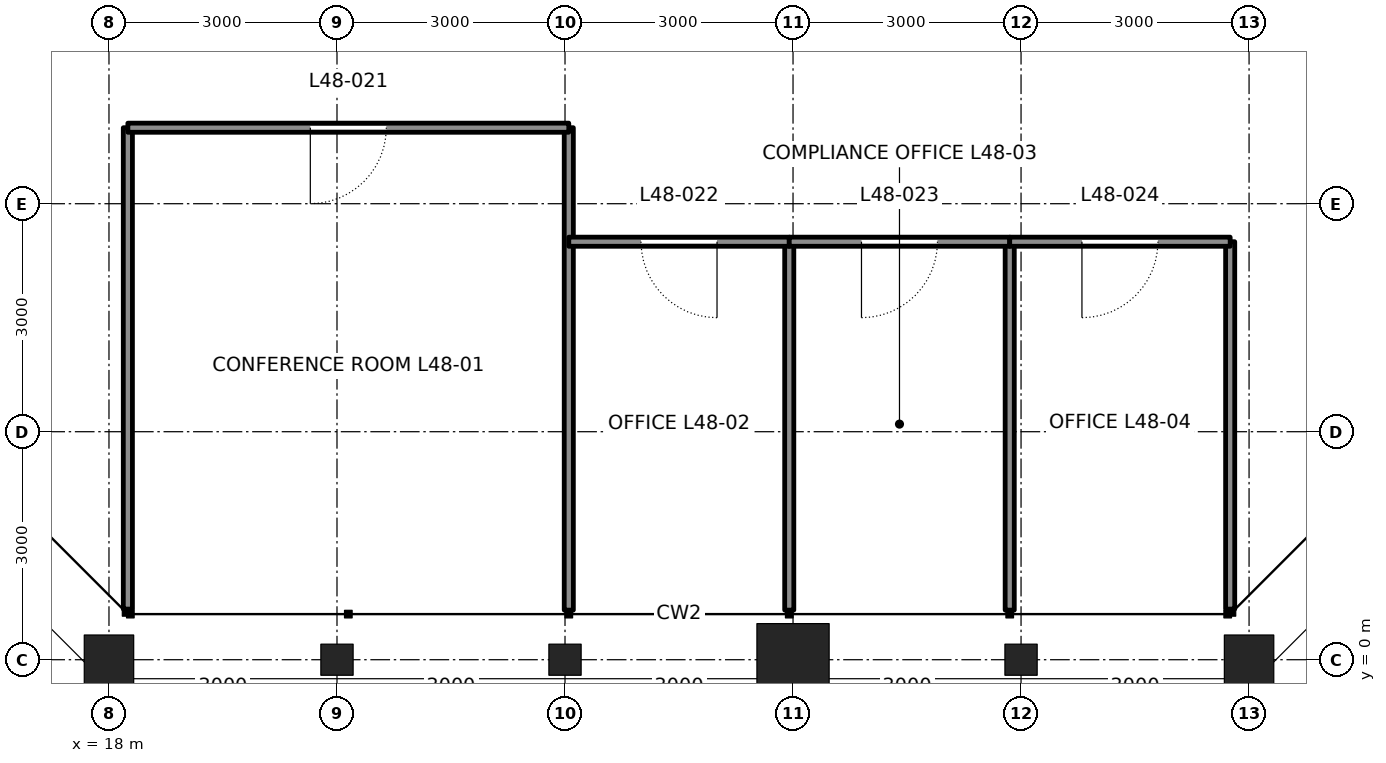
"""IFC4 building model, lengths in metres.
Left out: names, types, materials, properties, quantities, classifications, styles, units other than length and angle.
Written with IfcOpenShell. Run it as: python <this file> out.ifc"""

import sys

from ifc_helpers import new_model, si_unit, direction, frame, frame_2d, origin, origin_2d, place, context, subcontext, project, spatial, rectangle, hollow_rectangle, i_section, extrude, element, fill, save


model = new_model("IFC4")
c1 = context("Model", 3, precision=1e-05, world=origin(), true_north=direction((0.0, 1.0)))
c2 = subcontext(c1, "Body", "Model", "MODEL_VIEW")
j1 = project(units=[si_unit("LENGTHUNIT", "METRE"), si_unit("PLANEANGLEUNIT", "RADIAN")], contexts=[c1])
p1 = place(None, origin())
s1 = spatial("IfcSite", under=j1, at=p1, CompositionType="ELEMENT")
p2 = place(p1, origin())
s2 = spatial("IfcBuilding", under=s1, at=p2, CompositionType="ELEMENT")
p3 = place(p2, frame((0.0, 0.0, 218.1)))
s3 = spatial("IfcBuildingStorey", under=s2, at=p3, CompositionType="ELEMENT", Elevation=218.1)
p4 = place(p3, frame((18.0, 0.0, 0.0), z_axis=(0.0, 0.0, 1.0), x_axis=(0.0, -1.0, 0.0)))
e1 = element("IfcColumn", 1, at=p4, inside=s3, PredefinedType="COLUMN", context=c2, shape_type="SweptSolid", body=[
    extrude(hollow_rectangle(XDim=0.65, YDim=0.65, WallThickness=0.065, at=origin_2d()), origin(), (0.0, 0.0, 1.0), 4.2),
])
for number, where, z_axis, x_axis in (
    (2, (21.0, 0.0, 0.0), (0.0, 0.0, 1.0), (0.0, -1.0, 0.0)),
    (3, (24.0, 0.0, 0.0), (0.0, 0.0, 1.0), (0.0, -1.0, 0.0)),
):
    element("IfcColumn", number, at=place(p3, frame(where, z_axis=z_axis, x_axis=x_axis)), inside=s3, PredefinedType="COLUMN", context=c2, shape_type="SweptSolid", body=[
        extrude(i_section(OverallWidth=0.409, OverallDepth=0.424, WebThickness=0.033, FlangeThickness=0.052, at=origin_2d()), origin(), (0.0, 0.0, 1.0), 4.2),
    ])
p5 = place(p3, frame((27.0, 0.0, 0.0), z_axis=(0.0, 0.0, 1.0), x_axis=(0.0, -1.0, 0.0)))
e4 = element("IfcColumn", 4, at=p5, inside=s3, PredefinedType="COLUMN", context=c2, shape_type="SweptSolid", body=[
    extrude(hollow_rectangle(XDim=0.95, YDim=0.95, WallThickness=0.11, at=origin_2d()), origin(), (0.0, 0.0, 1.0), 4.2),
])
p6 = place(p3, frame((30.0, 0.0, 0.0), z_axis=(0.0, 0.0, 1.0), x_axis=(0.0, -1.0, 0.0)))
e5 = element("IfcColumn", 5, at=p6, inside=s3, PredefinedType="COLUMN", context=c2, shape_type="SweptSolid", body=[
    extrude(i_section(OverallWidth=0.409, OverallDepth=0.424, WebThickness=0.033, FlangeThickness=0.052, at=origin_2d()), origin(), (0.0, 0.0, 1.0), 4.2),
])
p7 = place(p3, frame((33.0, 0.0, 0.0), z_axis=(0.0, 0.0, 1.0), x_axis=(0.0, -1.0, 0.0)))
e6 = element("IfcColumn", 6, at=p7, inside=s3, PredefinedType="COLUMN", context=c2, shape_type="SweptSolid", body=[
    extrude(hollow_rectangle(XDim=0.65, YDim=0.65, WallThickness=0.065, at=origin_2d()), origin(), (0.0, 0.0, 1.0), 4.2),
])
p8 = place(p3, frame((18.249, 0.666, 0.0), z_axis=(0.0, 0.0, 1.0), x_axis=(0.0, 1.0, 0.0)))
e7 = element("IfcWall", 7, at=p8, inside=s3, PredefinedType="PARTITIONING", context=c2, shape_type="SweptSolid", body=[
    extrude(rectangle(XDim=6.334, YDim=0.12, at=frame_2d((3.167, 0.0))), origin(), (0.0, 0.0, 1.0), 4.04),
])
p9 = place(p3, frame((24.05, 0.653, 0.0), z_axis=(0.0, 0.0, 1.0), x_axis=(0.0, 1.0, 0.0)))
e8 = element("IfcWall", 8, at=p9, inside=s3, PredefinedType="PARTITIONING", context=c2, shape_type="SweptSolid", body=[
    extrude(rectangle(XDim=6.347, YDim=0.12, at=frame_2d((3.174, 0.0))), origin(), (0.0, 0.0, 1.0), 3.357),
])
p10 = place(p3, frame((26.95, 0.653, 0.0), z_axis=(0.0, 0.0, 1.0), x_axis=(0.0, 1.0, 0.0)))
e9 = element("IfcWall", 9, at=p10, inside=s3, PredefinedType="PARTITIONING", context=c2, shape_type="SweptSolid", body=[
    extrude(rectangle(XDim=4.847, YDim=0.12, at=frame_2d((2.424, 0.0))), origin(), (0.0, 0.0, 1.0), 3.357),
])
p11 = place(p3, frame((29.851, 0.653, 0.0), z_axis=(0.0, 0.0, 1.0), x_axis=(0.0, 1.0, 0.0)))
e10 = element("IfcWall", 10, at=p11, inside=s3, PredefinedType="PARTITIONING", context=c2, shape_type="SweptSolid", body=[
    extrude(rectangle(XDim=4.847, YDim=0.12, at=frame_2d((2.424, 0.0))), origin(), (0.0, 0.0, 1.0), 4.04),
])
p12 = place(p3, frame((32.751, 0.666, 0.0), z_axis=(0.0, 0.0, 1.0), x_axis=(0.0, 1.0, 0.0)))
e11 = element("IfcWall", 11, at=p12, inside=s3, PredefinedType="PARTITIONING", context=c2, shape_type="SweptSolid", body=[
    extrude(rectangle(XDim=4.834, YDim=0.12, at=frame_2d((2.417, 0.0))), origin(), (0.0, 0.0, 1.0), 4.04),
])
p13 = place(p3, frame((18.249, 7.0, 0.0), z_axis=(0.0, 0.0, 1.0), x_axis=(1.0, 0.0, 0.0)))
e12 = element("IfcWall", 12, at=p13, inside=s3, PredefinedType="PARTITIONING", context=c2, shape_type="SweptSolid", body=[
    extrude(rectangle(XDim=5.801, YDim=0.12, at=frame_2d((2.901, 0.0))), origin(), (0.0, 0.0, 1.0), 4.04),
])
p14 = place(p13, frame((2.401, 0.0, 0.0)))
e13 = element("IfcOpeningElement", 13, at=p14, cuts=e12, PredefinedType="OPENING", context=c2, shape_type="SweptSolid", body=[
    extrude(rectangle(XDim=1.0, YDim=2.4, at=frame_2d((0.5, 1.2))), frame((0.0, 0.07, 0.0), z_axis=(0.0, -1.0, 0.0), x_axis=(1.0, 0.0, 0.0)), (0.0, 0.0, 1.0), 0.14),
])
p15 = place(p3, frame((24.05, 5.5, 0.0), z_axis=(0.0, 0.0, 1.0), x_axis=(1.0, 0.0, 0.0)))
e14 = element("IfcWall", 14, at=p15, inside=s3, PredefinedType="PARTITIONING", context=c2, shape_type="SweptSolid", body=[
    extrude(rectangle(XDim=2.9, YDim=0.12, at=frame_2d((1.45, 0.0))), origin(), (0.0, 0.0, 1.0), 4.04),
])
p16 = place(p15, frame((0.95, 0.0, 0.0)))
e15 = element("IfcOpeningElement", 15, at=p16, cuts=e14, PredefinedType="OPENING", context=c2, shape_type="SweptSolid", body=[
    extrude(rectangle(XDim=1.0, YDim=2.4, at=frame_2d((0.5, 1.2))), frame((0.0, 0.07, 0.0), z_axis=(0.0, -1.0, 0.0), x_axis=(1.0, 0.0, 0.0)), (0.0, 0.0, 1.0), 0.14),
])
p17 = place(p3, frame((26.95, 5.5, 0.0), z_axis=(0.0, 0.0, 1.0), x_axis=(1.0, 0.0, 0.0)))
e16 = element("IfcWall", 16, at=p17, inside=s3, PredefinedType="PARTITIONING", context=c2, shape_type="SweptSolid", body=[
    extrude(rectangle(XDim=2.901, YDim=0.12, at=frame_2d((1.45, 0.0))), origin(), (0.0, 0.0, 1.0), 4.04),
])
p18 = place(p17, frame((0.95, 0.0, 0.0)))
e17 = element("IfcOpeningElement", 17, at=p18, cuts=e16, PredefinedType="OPENING", context=c2, shape_type="SweptSolid", body=[
    extrude(rectangle(XDim=1.0, YDim=2.4, at=frame_2d((0.5, 1.2))), frame((0.0, 0.07, 0.0), z_axis=(0.0, -1.0, 0.0), x_axis=(1.0, 0.0, 0.0)), (0.0, 0.0, 1.0), 0.14),
])
p19 = place(p3, frame((29.851, 5.5, 0.0), z_axis=(0.0, 0.0, 1.0), x_axis=(1.0, 0.0, 0.0)))
e18 = element("IfcWall", 18, at=p19, inside=s3, PredefinedType="PARTITIONING", context=c2, shape_type="SweptSolid", body=[
    extrude(rectangle(XDim=2.901, YDim=0.12, at=frame_2d((1.45, 0.0))), origin(), (0.0, 0.0, 1.0), 4.04),
])
p20 = place(p19, frame((0.95, 0.0, 0.0)))
e19 = element("IfcOpeningElement", 19, at=p20, cuts=e18, PredefinedType="OPENING", context=c2, shape_type="SweptSolid", body=[
    extrude(rectangle(XDim=1.0, YDim=2.4, at=frame_2d((0.5, 1.2))), frame((0.0, 0.07, 0.0), z_axis=(0.0, -1.0, 0.0), x_axis=(1.0, 0.0, 0.0)), (0.0, 0.0, 1.0), 0.14),
])
p21 = place(p14, frame((1.0, 0.0, 0.0), z_axis=(0.0, 0.0, 1.0), x_axis=(-1.0, 0.0, 0.0)))
e20 = element("IfcDoor", 20, at=p21, inside=s3, OperationType="SINGLE_SWING_RIGHT", PredefinedType="DOOR", context=c2, shape_type="SweptSolid", body=[
    extrude(rectangle(XDim=1.0, YDim=2.4, at=frame_2d((0.5, 1.2))), frame((0.0, 0.025, 0.0), z_axis=(0.0, -1.0, 0.0), x_axis=(1.0, 0.0, 0.0)), (0.0, 0.0, 1.0), 0.05),
])
fill(e13, e20)
p22 = place(p16, frame((1.0, 0.0, 0.0), z_axis=(0.0, 0.0, 1.0), x_axis=(-1.0, 0.0, 0.0)))
e21 = element("IfcDoor", 21, at=p22, inside=s3, OperationType="SINGLE_SWING_LEFT", PredefinedType="DOOR", context=c2, shape_type="SweptSolid", body=[
    extrude(rectangle(XDim=1.0, YDim=2.4, at=frame_2d((0.5, 1.2))), frame((0.0, 0.025, 0.0), z_axis=(0.0, -1.0, 0.0), x_axis=(1.0, 0.0, 0.0)), (0.0, 0.0, 1.0), 0.05),
])
fill(e15, e21)
p23 = place(p18, frame((1.0, 0.0, 0.0), z_axis=(0.0, 0.0, 1.0), x_axis=(-1.0, 0.0, 0.0)))
e22 = element("IfcDoor", 22, at=p23, inside=s3, OperationType="SINGLE_SWING_RIGHT", PredefinedType="DOOR", context=c2, shape_type="SweptSolid", body=[
    extrude(rectangle(XDim=1.0, YDim=2.4, at=frame_2d((0.5, 1.2))), frame((0.0, 0.025, 0.0), z_axis=(0.0, -1.0, 0.0), x_axis=(1.0, 0.0, 0.0)), (0.0, 0.0, 1.0), 0.05),
])
fill(e17, e22)
p24 = place(p20, frame((1.0, 0.0, 0.0), z_axis=(0.0, 0.0, 1.0), x_axis=(-1.0, 0.0, 0.0)))
e23 = element("IfcDoor", 23, at=p24, inside=s3, OperationType="SINGLE_SWING_RIGHT", PredefinedType="DOOR", context=c2, shape_type="SweptSolid", body=[
    extrude(rectangle(XDim=1.0, YDim=2.4, at=frame_2d((0.5, 1.2))), frame((0.0, 0.025, 0.0), z_axis=(0.0, -1.0, 0.0), x_axis=(1.0, 0.0, 0.0)), (0.0, 0.0, 1.0), 0.05),
])
fill(e19, e23)
save(model, sys.argv[1])
